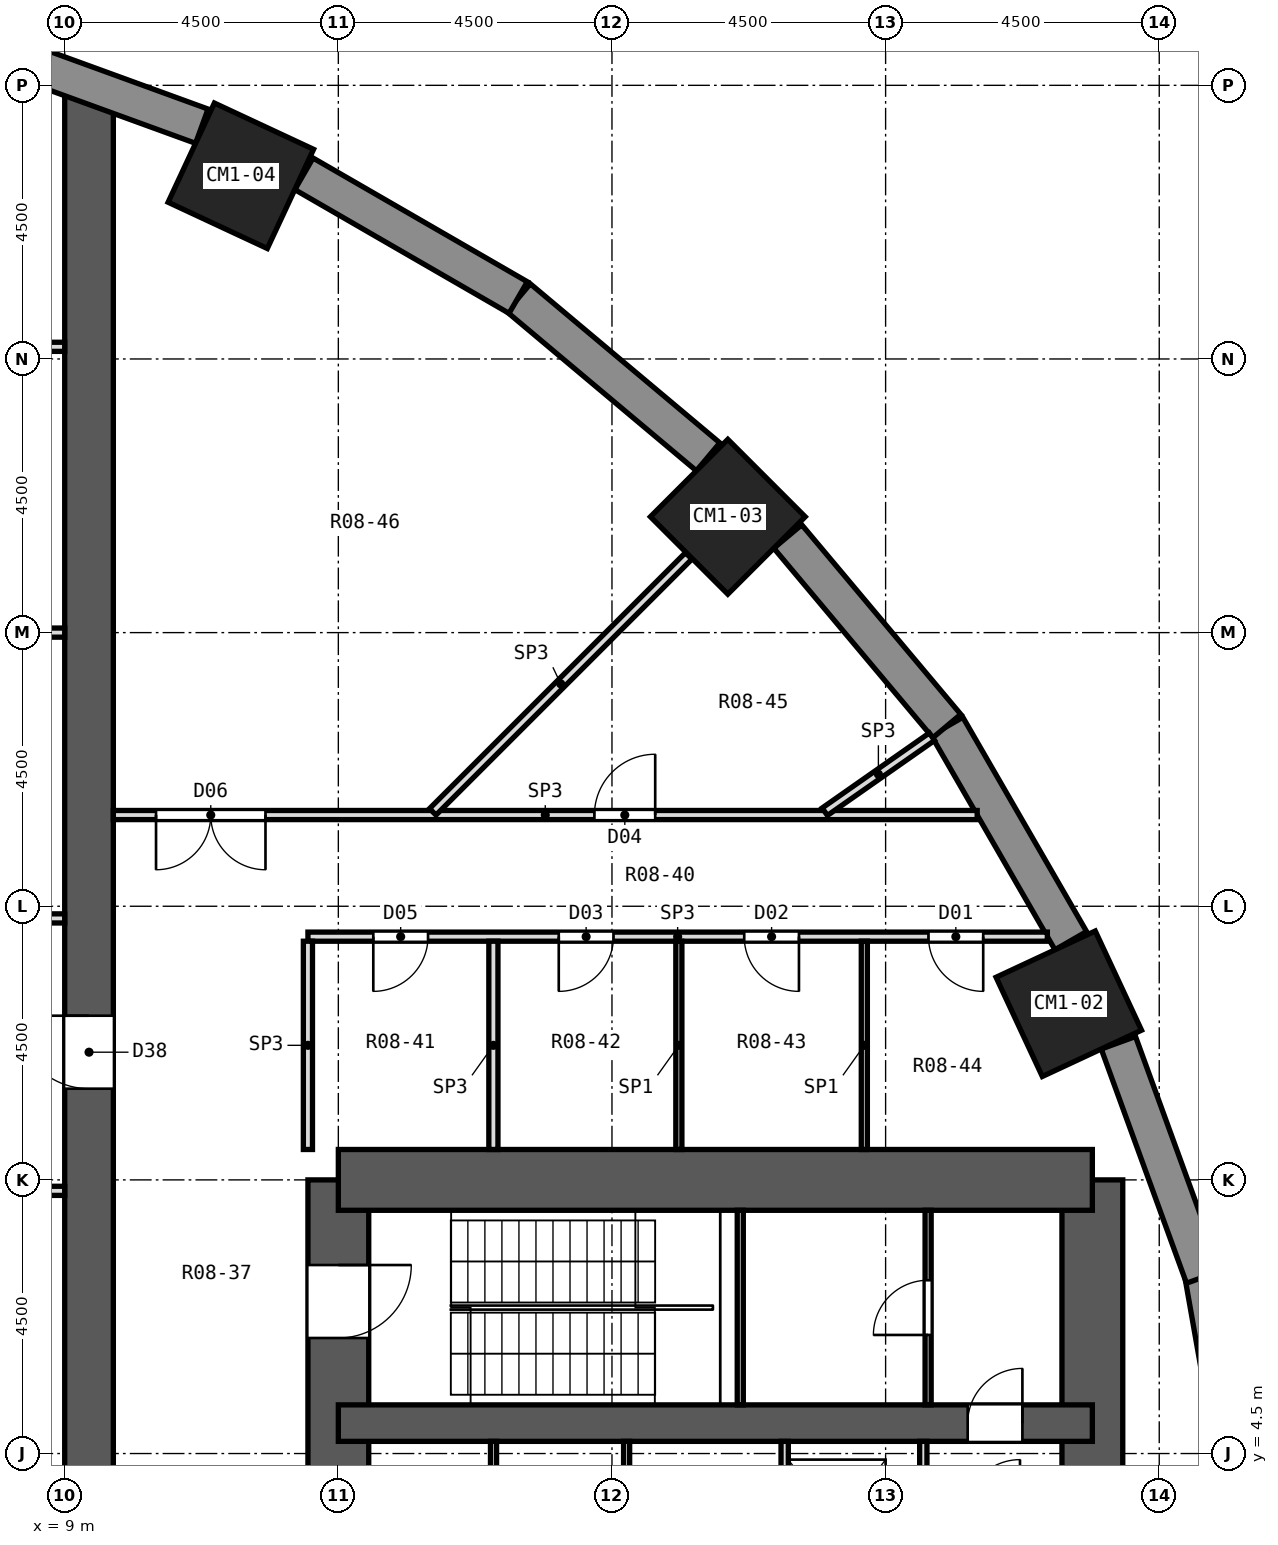
"""IFC4 building model, lengths in metres.
Left out: names, types, materials, properties, quantities, classifications, styles, units other than length and angle.
Written with IfcOpenShell. Run it as: python <this file> out.ifc"""

import sys

from ifc_helpers import new_model, si_unit, direction, frame, frame_2d, origin, origin_2d, place, context, subcontext, project, spatial, rectangle, extrude, element, fill, save


model = new_model("IFC4")
c1 = context("Model", 3, precision=1e-05, world=origin(), true_north=direction((0.0, 1.0)))
c2 = subcontext(c1, "Body", "Model", "MODEL_VIEW")
j1 = project(units=[si_unit("LENGTHUNIT", "METRE"), si_unit("PLANEANGLEUNIT", "RADIAN")], contexts=[c1])
p1 = place(None, origin())
s1 = spatial("IfcSite", under=j1, at=p1, CompositionType="ELEMENT")
p2 = place(p1, origin())
s2 = spatial("IfcBuilding", under=s1, at=p2, CompositionType="ELEMENT")
p3 = place(p2, frame((0.0, 0.0, 21.8)))
s3 = spatial("IfcBuildingStorey", under=s2, at=p3, CompositionType="ELEMENT", Elevation=21.8)
for number, where, z_axis, x_axis in (
    (1, (25.512, 11.897, 0.0), (0.0, 0.0, 1.0), (0.906, 0.423, 0.0)),
    (2, (19.905, 19.905, 0.0), (0.0, 0.0, 1.0), (0.707, 0.707, 0.0)),
    (3, (11.897, 25.512, 0.0), (0.0, 0.0, 1.0), (0.423, 0.906, 0.0)),
):
    element("IfcColumn", number, at=place(p3, frame(where, z_axis=z_axis, x_axis=x_axis)), inside=s3, PredefinedType="COLUMN", context=c2, shape_type="SweptSolid", body=[
        extrude(rectangle(XDim=1.8, YDim=1.8, at=origin_2d()), origin(), (0.0, 0.0, 1.0), 4.5),
    ])
p4 = place(p3, frame((13.5, -9.0, 0.0), z_axis=(0.0, 0.0, 1.0), x_axis=(0.0, 1.0, 0.0)))
e4 = element("IfcWall", 4, at=p4, inside=s3, PredefinedType="SHEAR", context=c2, shape_type="SweptSolid", body=[
    extrude(rectangle(XDim=18.0, YDim=1.0, at=frame_2d((9.0, 0.0))), origin(), (0.0, 0.0, 1.0), 4.5),
])
p5 = place(p4, frame((15.4, 0.0, 0.0)))
e5 = element("IfcOpeningElement", 5, at=p5, cuts=e4, PredefinedType="OPENING", context=c2, shape_type="SweptSolid", body=[
    extrude(rectangle(XDim=1.2, YDim=2.1, at=frame_2d((0.6, 1.05))), frame((0.0, 0.512, 0.0), z_axis=(0.0, -1.0, 0.0), x_axis=(1.0, 0.0, 0.0)), (0.0, 0.0, 1.0), 1.024),
])
p6 = place(p4, frame((1.4, 0.0, 0.0)))
e6 = element("IfcOpeningElement", 6, at=p6, cuts=e4, PredefinedType="OPENING", context=c2, shape_type="SweptSolid", body=[
    extrude(rectangle(XDim=1.2, YDim=2.1, at=frame_2d((0.6, 1.05))), frame((0.0, 0.512, 0.0), z_axis=(0.0, -1.0, 0.0), x_axis=(1.0, 0.0, 0.0)), (0.0, 0.0, 1.0), 1.024),
])
p7 = place(p4, frame((7.5, 0.0, 0.0)))
e7 = element("IfcOpeningElement", 7, at=p7, cuts=e4, PredefinedType="OPENING", context=c2, shape_type="SweptSolid", body=[
    extrude(rectangle(XDim=3.0, YDim=2.4, at=frame_2d((1.5, 1.2))), frame((0.0, 0.512, 0.0), z_axis=(0.0, -1.0, 0.0), x_axis=(1.0, 0.0, 0.0)), (0.0, 0.0, 1.0), 1.024),
])
p8 = place(p3, frame((25.9, -9.0, 0.0), z_axis=(0.0, 0.0, 1.0), x_axis=(0.0, 1.0, 0.0)))
e8 = element("IfcWall", 8, at=p8, inside=s3, PredefinedType="SHEAR", context=c2, shape_type="SweptSolid", body=[
    extrude(rectangle(XDim=18.0, YDim=1.0, at=frame_2d((9.0, 0.0))), origin(), (0.0, 0.0, 1.0), 4.5),
])
p9 = place(p3, frame((13.5, 9.0, 0.0), z_axis=(0.0, 0.0, 1.0), x_axis=(1.0, 0.0, 0.0)))
e9 = element("IfcWall", 9, at=p9, inside=s3, PredefinedType="SHEAR", context=c2, shape_type="SweptSolid", body=[
    extrude(rectangle(XDim=12.4, YDim=1.0, at=frame_2d((6.2, 0.0))), origin(), (0.0, 0.0, 1.0), 4.5),
])
p10 = place(p3, frame((13.5, 5.0, 0.0), z_axis=(0.0, 0.0, 1.0), x_axis=(1.0, 0.0, 0.0)))
e10 = element("IfcWall", 10, at=p10, inside=s3, PredefinedType="SHEAR", context=c2, shape_type="SweptSolid", body=[
    extrude(rectangle(XDim=12.4, YDim=0.6, at=frame_2d((6.2, 0.0))), origin(), (0.0, 0.0, 1.0), 4.5),
])
p11 = place(p10, frame((10.35, 0.0, 0.0)))
e11 = element("IfcOpeningElement", 11, at=p11, cuts=e10, PredefinedType="OPENING", context=c2, shape_type="SweptSolid", body=[
    extrude(rectangle(XDim=0.9, YDim=2.1, at=frame_2d((0.45, 1.05))), frame((0.0, 0.312, 0.0), z_axis=(0.0, -1.0, 0.0), x_axis=(1.0, 0.0, 0.0)), (0.0, 0.0, 1.0), 0.624),
])
p12 = place(p3, frame((9.4, -27.077, 0.0), z_axis=(0.0, 0.0, 1.0), x_axis=(0.0, 1.0, 0.0)))
e12 = element("IfcWall", 12, at=p12, inside=s3, PredefinedType="SHEAR", context=c2, shape_type="SweptSolid", body=[
    extrude(rectangle(XDim=54.154, YDim=0.8, at=frame_2d((27.077, 0.0))), origin(), (0.0, 0.0, 1.0), 4.5),
])
p13 = place(p12, frame((15.377, 0.0, 0.0)))
e13 = element("IfcOpeningElement", 13, at=p13, cuts=e12, PredefinedType="OPENING", context=c2, shape_type="SweptSolid", body=[
    extrude(rectangle(XDim=1.2, YDim=2.1, at=frame_2d((0.6, 1.05))), frame((0.0, 0.412, 0.0), z_axis=(0.0, -1.0, 0.0), x_axis=(1.0, 0.0, 0.0)), (0.0, 0.0, 1.0), 0.824),
])
p14 = place(p12, frame((37.577, 0.0, 0.0)))
e14 = element("IfcOpeningElement", 14, at=p14, cuts=e12, PredefinedType="OPENING", context=c2, shape_type="SweptSolid", body=[
    extrude(rectangle(XDim=1.2, YDim=2.1, at=frame_2d((0.6, 1.05))), frame((0.0, 0.412, 0.0), z_axis=(0.0, -1.0, 0.0), x_axis=(1.0, 0.0, 0.0)), (0.0, 0.0, 1.0), 0.824),
])
p15 = place(p3, frame((28.428, 3.417, 0.0), z_axis=(0.0, 0.0, 1.0), x_axis=(-0.173673210505, 0.984803338719, 0.0)))
e15 = element("IfcWall", 15, at=p15, inside=s3, PredefinedType="SOLIDWALL", context=c2, shape_type="SweptSolid", body=[
    extrude(rectangle(XDim=4.099, YDim=0.6, at=frame_2d((2.05, 0.0))), origin(), (0.0, 0.0, 1.0), 2.15),
])
p16 = place(p3, frame((27.73, 7.403, 0.0), z_axis=(0.0, 0.0, 1.0), x_axis=(-0.342034744565, 0.939687306241, 0.0)))
e16 = element("IfcWall", 16, at=p16, inside=s3, PredefinedType="SOLIDWALL", context=c2, shape_type="SweptSolid", body=[
    extrude(rectangle(XDim=4.099, YDim=0.6, at=frame_2d((2.05, 0.0))), origin(), (0.0, 0.0, 1.0), 2.15),
])
p17 = place(p3, frame((25.545, 12.934, 0.0), z_axis=(0.0, 0.0, 1.0), x_axis=(-0.500023678693, 0.866011732453, 0.0)))
e17 = element("IfcWall", 17, at=p17, inside=s3, PredefinedType="SOLIDWALL", context=c2, shape_type="SweptSolid", body=[
    extrude(rectangle(XDim=4.069, YDim=0.6, at=frame_2d((2.035, 0.0))), origin(), (0.0, 0.0, 1.0), 2.15),
])
for number, where, z_axis, x_axis in (
    (18, (23.506, 16.464, 0.0), (0.0, 0.0, 1.0), (-0.643, 0.766, 0.0)),
    (19, (19.581, 20.891, 0.0), (0.0, 0.0, 1.0), (-0.766, 0.643, 0.0)),
):
    element("IfcWall", number, at=place(p3, frame(where, z_axis=z_axis, x_axis=x_axis)), inside=s3, PredefinedType="SOLIDWALL", context=c2, shape_type="SweptSolid", body=[
        extrude(rectangle(XDim=4.069, YDim=0.6, at=frame_2d((2.035, 0.0))), origin(), (0.0, 0.0, 1.0), 2.15),
    ])
p18 = place(p3, frame((16.458, 23.51, 0.0), z_axis=(0.0, 0.0, 1.0), x_axis=(-0.866011732453, 0.500023678693, 0.0)))
e20 = element("IfcWall", 20, at=p18, inside=s3, PredefinedType="SOLIDWALL", context=c2, shape_type="SweptSolid", body=[
    extrude(rectangle(XDim=4.069, YDim=0.6, at=frame_2d((2.035, 0.0))), origin(), (0.0, 0.0, 1.0), 2.15),
])
p19 = place(p3, frame((11.255, 26.328, 0.0), z_axis=(0.0, 0.0, 1.0), x_axis=(-0.939683013865, 0.342046536971, 0.0)))
e21 = element("IfcWall", 21, at=p19, inside=s3, PredefinedType="SOLIDWALL", context=c2, shape_type="SweptSolid", body=[
    extrude(rectangle(XDim=4.069, YDim=0.6, at=frame_2d((2.035, 0.0))), origin(), (0.0, 0.0, 1.0), 3.95),
])
p20 = place(p3, frame((-9.0, 8.82, 0.0), z_axis=(0.0, 0.0, 1.0), x_axis=(1.0, 0.0, 0.0)))
e22 = element("IfcWall", 22, at=p20, inside=s3, PredefinedType="PARTITIONING", context=c2, shape_type="SweptSolid", body=[
    extrude(rectangle(XDim=18.0, YDim=0.15, at=frame_2d((9.0, 0.0))), origin(), (0.0, 0.0, 1.0), 3.95),
])
p21 = place(p3, frame((13.0, 13.0, 0.0), z_axis=(0.0, 0.0, 1.0), x_axis=(1.0, 0.0, 0.0)))
e23 = element("IfcWall", 23, at=p21, inside=s3, PredefinedType="PARTITIONING", context=c2, shape_type="SweptSolid", body=[
    extrude(rectangle(XDim=12.16, YDim=0.15, at=frame_2d((6.08, 0.0))), origin(), (0.0, 0.0, 1.0), 3.95),
])
p22 = place(p21, frame((10.205, 0.0, 0.0)))
e24 = element("IfcOpeningElement", 24, at=p22, cuts=e23, PredefinedType="OPENING", context=c2, shape_type="SweptSolid", body=[
    extrude(rectangle(XDim=0.9, YDim=2.1, at=frame_2d((0.45, 1.05))), frame((0.0, 0.087, 0.0), z_axis=(0.0, -1.0, 0.0), x_axis=(1.0, 0.0, 0.0)), (0.0, 0.0, 1.0), 0.174),
])
p23 = place(p21, frame((7.175, 0.0, 0.0)))
e25 = element("IfcOpeningElement", 25, at=p23, cuts=e23, PredefinedType="OPENING", context=c2, shape_type="SweptSolid", body=[
    extrude(rectangle(XDim=0.9, YDim=2.1, at=frame_2d((0.45, 1.05))), frame((0.0, 0.087, 0.0), z_axis=(0.0, -1.0, 0.0), x_axis=(1.0, 0.0, 0.0)), (0.0, 0.0, 1.0), 0.174),
])
p24 = place(p21, frame((4.125, 0.0, 0.0)))
e26 = element("IfcOpeningElement", 26, at=p24, cuts=e23, PredefinedType="OPENING", context=c2, shape_type="SweptSolid", body=[
    extrude(rectangle(XDim=0.9, YDim=2.1, at=frame_2d((0.45, 1.05))), frame((0.0, 0.087, 0.0), z_axis=(0.0, -1.0, 0.0), x_axis=(1.0, 0.0, 0.0)), (0.0, 0.0, 1.0), 0.174),
])
p25 = place(p21, frame((1.075, 0.0, 0.0)))
e27 = element("IfcOpeningElement", 27, at=p25, cuts=e23, PredefinedType="OPENING", context=c2, shape_type="SweptSolid", body=[
    extrude(rectangle(XDim=0.9, YDim=2.1, at=frame_2d((0.45, 1.05))), frame((0.0, 0.087, 0.0), z_axis=(0.0, -1.0, 0.0), x_axis=(1.0, 0.0, 0.0)), (0.0, 0.0, 1.0), 0.174),
])
p26 = place(p3, frame((2.1, 13.3, 0.0), z_axis=(0.0, 0.0, 1.0), x_axis=(1.0, 0.0, 0.0)))
e28 = element("IfcWall", 28, at=p26, inside=s3, PredefinedType="PARTITIONING", context=c2, shape_type="SweptSolid", body=[
    extrude(rectangle(XDim=6.9, YDim=0.15, at=frame_2d((3.45, 0.0))), origin(), (0.0, 0.0, 1.0), 3.95),
])
p27 = place(p3, frame((9.8, 15.0, 0.0), z_axis=(0.0, 0.0, 1.0), x_axis=(1.0, 0.0, 0.0)))
e29 = element("IfcWall", 29, at=p27, inside=s3, PredefinedType="PARTITIONING", context=c2, shape_type="SweptSolid", body=[
    extrude(rectangle(XDim=14.206, YDim=0.15, at=frame_2d((7.103, 0.0))), origin(), (0.0, 0.0, 1.0), 3.95),
])
p28 = place(p27, frame((7.911, 0.0, 0.0)))
e30 = element("IfcOpeningElement", 30, at=p28, cuts=e29, PredefinedType="OPENING", context=c2, shape_type="SweptSolid", body=[
    extrude(rectangle(XDim=1.0, YDim=2.1, at=frame_2d((0.5, 1.05))), frame((0.0, 0.087, 0.0), z_axis=(0.0, -1.0, 0.0), x_axis=(1.0, 0.0, 0.0)), (0.0, 0.0, 1.0), 0.174),
])
p29 = place(p27, frame((0.702, 0.0, 0.0)))
e31 = element("IfcOpeningElement", 31, at=p29, cuts=e29, PredefinedType="OPENING", context=c2, shape_type="SweptSolid", body=[
    extrude(rectangle(XDim=1.8, YDim=2.1, at=frame_2d((0.9, 1.05))), frame((0.0, 0.087, 0.0), z_axis=(0.0, -1.0, 0.0), x_axis=(1.0, 0.0, 0.0)), (0.0, 0.0, 1.0), 0.174),
])
for number, where, z_axis, x_axis in (
    (32, (2.175, 18.0, 0.0), (0.0, 0.0, 1.0), (1.0, 0.0, 0.0)),
    (33, (2.175, 22.7, 0.0), (0.0, 0.0, 1.0), (1.0, 0.0, 0.0)),
):
    element("IfcWall", number, at=place(p3, frame(where, z_axis=z_axis, x_axis=x_axis)), inside=s3, PredefinedType="PARTITIONING", context=c2, shape_type="SweptSolid", body=[
        extrude(rectangle(XDim=6.825, YDim=0.15, at=frame_2d((3.413, 0.0))), origin(), (0.0, 0.0, 1.0), 3.95),
    ])
p30 = place(p3, frame((21.5, 15.054, 0.0), z_axis=(0.0, 0.0, 1.0), x_axis=(0.819210591937, 0.57349281256, 0.0)))
e34 = element("IfcWall", 34, at=p30, inside=s3, PredefinedType="PARTITIONING", context=c2, shape_type="SweptSolid", body=[
    extrude(rectangle(XDim=2.151, YDim=0.15, at=frame_2d((1.076, 0.0))), origin(), (0.0, 0.0, 1.0), 3.95),
])
p31 = place(p3, frame((15.053, 15.053, 0.0), z_axis=(0.0, 0.0, 1.0), x_axis=(0.707106781187, 0.707106781187, 0.0)))
e35 = element("IfcWall", 35, at=p31, inside=s3, PredefinedType="PARTITIONING", context=c2, shape_type="SweptSolid", body=[
    extrude(rectangle(XDim=5.952, YDim=0.15, at=frame_2d((2.976, 0.0))), origin(), (0.0, 0.0, 1.0), 3.95),
])
for number, where, z_axis, x_axis in (
    (36, (22.15, 9.5, 0.0), (0.0, 0.0, 1.0), (0.0, 1.0, 0.0)),
    (37, (19.1, 9.5, 0.0), (0.0, 0.0, 1.0), (0.0, 1.0, 0.0)),
):
    element("IfcWall", number, at=place(p3, frame(where, z_axis=z_axis, x_axis=x_axis)), inside=s3, PredefinedType="PARTITIONING", context=c2, shape_type="SweptSolid", body=[
        extrude(rectangle(XDim=3.425, YDim=0.1, at=frame_2d((1.712, 0.0))), origin(), (0.0, 0.0, 1.0), 3.95),
    ])
for number, where, z_axis, x_axis in (
    (38, (16.05, 9.5, 0.0), (0.0, 0.0, 1.0), (0.0, 1.0, 0.0)),
    (39, (13.0, 9.5, 0.0), (0.0, 0.0, 1.0), (0.0, 1.0, 0.0)),
):
    element("IfcWall", number, at=place(p3, frame(where, z_axis=z_axis, x_axis=x_axis)), inside=s3, PredefinedType="PARTITIONING", context=c2, shape_type="SweptSolid", body=[
        extrude(rectangle(XDim=3.425, YDim=0.15, at=frame_2d((1.712, 0.0))), origin(), (0.0, 0.0, 1.0), 3.95),
    ])
for number, where, z_axis, x_axis in (
    (40, (16.052, 2.3, 0.0), (0.0, 0.0, 1.0), (0.0, 1.0, 0.0)),
    (41, (18.241, 2.3, 0.0), (0.0, 0.0, 1.0), (0.0, 1.0, 0.0)),
):
    element("IfcWall", number, at=place(p3, frame(where, z_axis=z_axis, x_axis=x_axis)), inside=s3, PredefinedType="PARTITIONING", context=c2, shape_type="SweptSolid", body=[
        extrude(rectangle(XDim=2.4, YDim=0.1, at=frame_2d((1.2, 0.0))), origin(), (0.0, 0.0, 1.0), 3.95),
    ])
for number, where, z_axis, x_axis in (
    (42, (20.84, 2.3, 0.0), (0.0, 0.0, 1.0), (0.0, 1.0, 0.0)),
    (43, (23.12, 2.3, 0.0), (0.0, 0.0, 1.0), (0.0, 1.0, 0.0)),
):
    element("IfcWall", number, at=place(p3, frame(where, z_axis=z_axis, x_axis=x_axis)), inside=s3, PredefinedType="PARTITIONING", context=c2, shape_type="SweptSolid", body=[
        extrude(rectangle(XDim=2.4, YDim=0.12, at=frame_2d((1.2, 0.0))), origin(), (0.0, 0.0, 1.0), 3.95),
    ])
p32 = place(p3, frame((20.11, 5.3, 0.0), z_axis=(0.0, 0.0, 1.0), x_axis=(0.0, 1.0, 0.0)))
e44 = element("IfcWall", 44, at=p32, inside=s3, PredefinedType="PARTITIONING", context=c2, shape_type="SweptSolid", body=[
    extrude(rectangle(XDim=3.2, YDim=0.1, at=frame_2d((1.6, 0.0))), origin(), (0.0, 0.0, 1.0), 3.95),
])
p33 = place(p3, frame((23.199, 5.3, 0.0), z_axis=(0.0, 0.0, 1.0), x_axis=(0.0, 1.0, 0.0)))
e45 = element("IfcWall", 45, at=p33, inside=s3, PredefinedType="PARTITIONING", context=c2, shape_type="SweptSolid", body=[
    extrude(rectangle(XDim=3.2, YDim=0.1, at=frame_2d((1.6, 0.0))), origin(), (0.0, 0.0, 1.0), 3.95),
])
p34 = place(p33, frame((1.15, 0.0, 0.0)))
e46 = element("IfcOpeningElement", 46, at=p34, cuts=e45, PredefinedType="OPENING", context=c2, shape_type="SweptSolid", body=[
    extrude(rectangle(XDim=0.9, YDim=2.1, at=frame_2d((0.45, 1.05))), frame((0.0, 0.062, 0.0), z_axis=(0.0, -1.0, 0.0), x_axis=(1.0, 0.0, 0.0)), (0.0, 0.0, 1.0), 0.124),
])
p35 = place(p22, frame((0.9, 0.0, 0.0), z_axis=(0.0, 0.0, 1.0), x_axis=(-1.0, 0.0, 0.0)))
e47 = element("IfcDoor", 47, at=p35, inside=s3, OperationType="SINGLE_SWING_LEFT", PredefinedType="DOOR", context=c2, shape_type="SweptSolid", body=[
    extrude(rectangle(XDim=0.9, YDim=2.1, at=frame_2d((0.45, 1.05))), frame((0.0, 0.025, 0.0), z_axis=(0.0, -1.0, 0.0), x_axis=(1.0, 0.0, 0.0)), (0.0, 0.0, 1.0), 0.05),
])
fill(e24, e47)
p36 = place(p23, frame((0.9, 0.0, 0.0), z_axis=(0.0, 0.0, 1.0), x_axis=(-1.0, 0.0, 0.0)))
e48 = element("IfcDoor", 48, at=p36, inside=s3, OperationType="SINGLE_SWING_LEFT", PredefinedType="DOOR", context=c2, shape_type="SweptSolid", body=[
    extrude(rectangle(XDim=0.9, YDim=2.1, at=frame_2d((0.45, 1.05))), frame((0.0, 0.025, 0.0), z_axis=(0.0, -1.0, 0.0), x_axis=(1.0, 0.0, 0.0)), (0.0, 0.0, 1.0), 0.05),
])
fill(e25, e48)
p37 = place(p24, frame((0.9, 0.0, 0.0), z_axis=(0.0, 0.0, 1.0), x_axis=(-1.0, 0.0, 0.0)))
e49 = element("IfcDoor", 49, at=p37, inside=s3, OperationType="SINGLE_SWING_RIGHT", PredefinedType="DOOR", context=c2, shape_type="SweptSolid", body=[
    extrude(rectangle(XDim=0.9, YDim=2.1, at=frame_2d((0.45, 1.05))), frame((0.0, 0.025, 0.0), z_axis=(0.0, -1.0, 0.0), x_axis=(1.0, 0.0, 0.0)), (0.0, 0.0, 1.0), 0.05),
])
fill(e26, e49)
p38 = place(p28, origin())
e50 = element("IfcDoor", 50, at=p38, inside=s3, OperationType="SINGLE_SWING_RIGHT", PredefinedType="DOOR", context=c2, shape_type="SweptSolid", body=[
    extrude(rectangle(XDim=1.0, YDim=2.1, at=frame_2d((0.5, 1.05))), frame((0.0, 0.025, 0.0), z_axis=(0.0, -1.0, 0.0), x_axis=(1.0, 0.0, 0.0)), (0.0, 0.0, 1.0), 0.05),
])
fill(e30, e50)
p39 = place(p25, frame((0.9, 0.0, 0.0), z_axis=(0.0, 0.0, 1.0), x_axis=(-1.0, 0.0, 0.0)))
e51 = element("IfcDoor", 51, at=p39, inside=s3, OperationType="SINGLE_SWING_RIGHT", PredefinedType="DOOR", context=c2, shape_type="SweptSolid", body=[
    extrude(rectangle(XDim=0.9, YDim=2.1, at=frame_2d((0.45, 1.05))), frame((0.0, 0.025, 0.0), z_axis=(0.0, -1.0, 0.0), x_axis=(1.0, 0.0, 0.0)), (0.0, 0.0, 1.0), 0.05),
])
fill(e27, e51)
p40 = place(p29, frame((1.8, 0.0, 0.0), z_axis=(0.0, 0.0, 1.0), x_axis=(-1.0, 0.0, 0.0)))
e52 = element("IfcDoor", 52, at=p40, inside=s3, OperationType="DOUBLE_DOOR_SINGLE_SWING", PredefinedType="DOOR", context=c2, shape_type="SweptSolid", body=[
    extrude(rectangle(XDim=1.8, YDim=2.1, at=frame_2d((0.9, 1.05))), frame((0.0, 0.025, 0.0), z_axis=(0.0, -1.0, 0.0), x_axis=(1.0, 0.0, 0.0)), (0.0, 0.0, 1.0), 0.05),
])
fill(e31, e52)
p41 = place(p14, origin())
e53 = element("IfcDoor", 53, at=p41, inside=s3, OperationType="SINGLE_SWING_RIGHT", PredefinedType="DOOR", context=c2, shape_type="SweptSolid", body=[
    extrude(rectangle(XDim=1.2, YDim=2.1, at=frame_2d((0.6, 1.05))), frame((0.0, 0.025, 0.0), z_axis=(0.0, -1.0, 0.0), x_axis=(1.0, 0.0, 0.0)), (0.0, 0.0, 1.0), 0.05),
])
fill(e14, e53)
p42 = place(p34, origin())
e54 = element("IfcDoor", 54, at=p42, inside=s3, OperationType="SINGLE_SWING_LEFT", PredefinedType="DOOR", context=c2, shape_type="SweptSolid", body=[
    extrude(rectangle(XDim=0.9, YDim=2.1, at=frame_2d((0.45, 1.05))), frame((0.0, 0.025, 0.0), z_axis=(0.0, -1.0, 0.0), x_axis=(1.0, 0.0, 0.0)), (0.0, 0.0, 1.0), 0.05),
])
fill(e46, e54)
p43 = place(p11, origin())
e55 = element("IfcDoor", 55, at=p43, inside=s3, OperationType="SINGLE_SWING_RIGHT", PredefinedType="DOOR", context=c2, shape_type="SweptSolid", body=[
    extrude(rectangle(XDim=0.9, YDim=2.1, at=frame_2d((0.45, 1.05))), frame((0.0, 0.025, 0.0), z_axis=(0.0, -1.0, 0.0), x_axis=(1.0, 0.0, 0.0)), (0.0, 0.0, 1.0), 0.05),
])
fill(e11, e55)
p44 = place(p5, frame((1.2, 0.0, 0.0), z_axis=(0.0, 0.0, 1.0), x_axis=(-1.0, 0.0, 0.0)))
e56 = element("IfcDoor", 56, at=p44, inside=s3, OperationType="SINGLE_SWING_LEFT", PredefinedType="DOOR", context=c2, shape_type="SweptSolid", body=[
    extrude(rectangle(XDim=1.2, YDim=2.1, at=frame_2d((0.6, 1.05))), frame((0.0, 0.025, 0.0), z_axis=(0.0, -1.0, 0.0), x_axis=(1.0, 0.0, 0.0)), (0.0, 0.0, 1.0), 0.05),
])
fill(e5, e56)
save(model, sys.argv[1])
